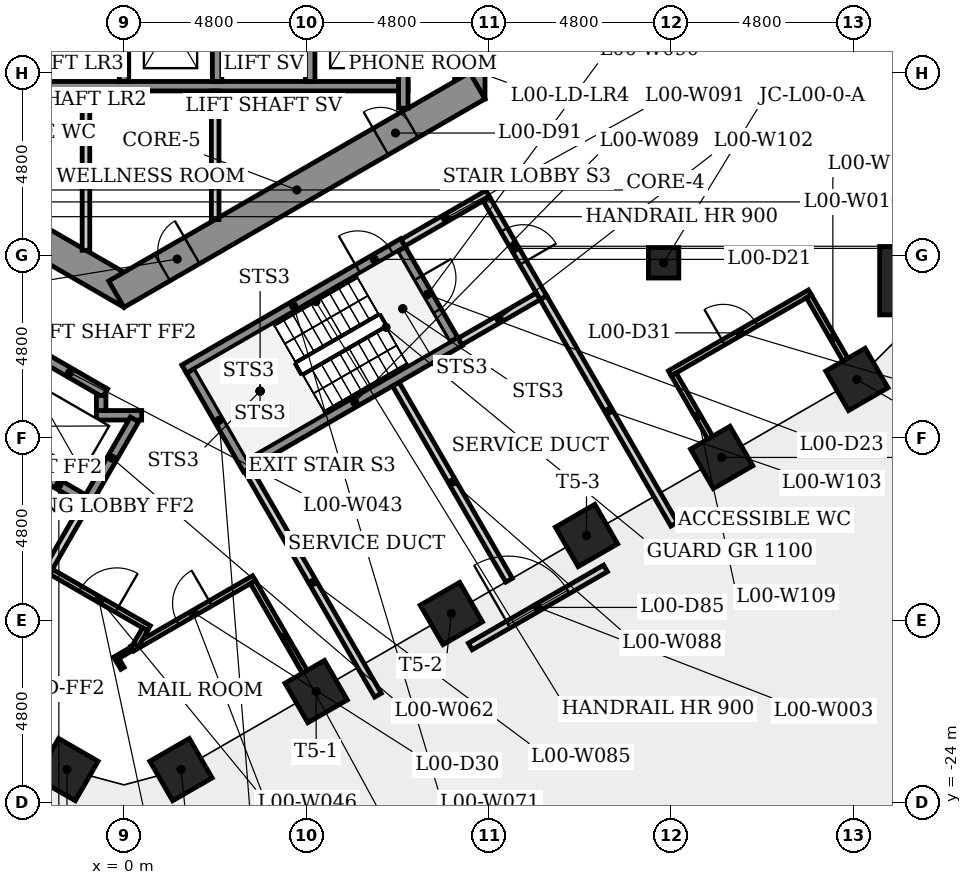
"""IFC4 building model, lengths in metres.
Left out: names, types, materials, properties, quantities, classifications, styles, units other than length and angle.
Written with IfcOpenShell. Run it as: python <this file> out.ifc"""

import sys

from ifc_helpers import new_model, si_unit, direction, frame, frame_2d, origin, origin_2d, place, context, subcontext, project, spatial, rectangle, extrude, element, fill, save


model = new_model("IFC4")
c1 = context("Model", 3, precision=1e-05, world=origin(), true_north=direction((0.0, 1.0)))
c2 = subcontext(c1, "Body", "Model", "MODEL_VIEW")
j1 = project(units=[si_unit("LENGTHUNIT", "METRE"), si_unit("PLANEANGLEUNIT", "RADIAN")], contexts=[c1])
p1 = place(None, origin())
s1 = spatial("IfcSite", under=j1, at=p1, CompositionType="ELEMENT")
p2 = place(p1, origin())
s2 = spatial("IfcBuilding", under=s1, at=p2, CompositionType="ELEMENT")
p3 = place(p2, origin())
s3 = spatial("IfcBuildingStorey", under=s2, at=p3, CompositionType="ELEMENT", Elevation=0.0)
p4 = place(p3, frame((9.1, -5.485, -0.5), z_axis=(0.0, 0.0, 1.0), x_axis=(0.0, 1.0, 0.0)))
e1 = element("IfcWall", 1, at=p4, inside=s3, PredefinedType="SHEAR", context=c2, shape_type="SweptSolid", body=[
    extrude(rectangle(XDim=10.97, YDim=0.8, at=frame_2d((5.485, 0.0))), origin(), (0.0, 0.0, 1.0), 7.5),
])
p5 = place(p4, frame((4.685, 0.0, 0.5)))
e2 = element("IfcOpeningElement", 2, at=p5, cuts=e1, PredefinedType="OPENING", context=c2, shape_type="SweptSolid", body=[
    extrude(rectangle(XDim=1.6, YDim=2.1, at=frame_2d((0.8, 1.05))), frame((0.0, 0.41, 0.0), z_axis=(0.0, -1.0, 0.0), x_axis=(1.0, 0.0, 0.0)), (0.0, 0.0, 1.0), 0.82),
])
p6 = place(p3, frame((-9.3, -5.138, -0.5), z_axis=(0.0, 0.0, 1.0), x_axis=(0.866023993627, -0.500002442456, 0.0)))
e3 = element("IfcWall", 3, at=p6, inside=s3, PredefinedType="SHEAR", context=c2, shape_type="SweptSolid", body=[
    extrude(rectangle(XDim=10.97, YDim=0.8, at=frame_2d((5.485, 0.0))), origin(), (0.0, 0.0, 1.0), 7.5),
])
p7 = place(p6, frame((2.845, 0.0, 0.5)))
e4 = element("IfcOpeningElement", 4, at=p7, cuts=e3, PredefinedType="OPENING", context=c2, shape_type="SweptSolid", body=[
    extrude(rectangle(XDim=0.9, YDim=2.1, at=frame_2d((0.45, 1.05))), frame((0.0, 0.41, 0.0), z_axis=(0.0, -1.0, 0.0), x_axis=(1.0, 0.0, 0.0)), (0.0, 0.0, 1.0), 0.82),
])
p8 = place(p3, frame((-0.2, -10.623, -0.5), z_axis=(0.0, 0.0, 1.0), x_axis=(0.866023993627, 0.500002442456, 0.0)))
e5 = element("IfcWall", 5, at=p8, inside=s3, PredefinedType="SHEAR", context=c2, shape_type="SweptSolid", body=[
    extrude(rectangle(XDim=10.97, YDim=0.8, at=frame_2d((5.485, 0.0))), origin(), (0.0, 0.0, 1.0), 7.5),
])
p9 = place(p8, frame((1.398, 0.0, 0.5)))
e6 = element("IfcOpeningElement", 6, at=p9, cuts=e5, PredefinedType="OPENING", context=c2, shape_type="SweptSolid", body=[
    extrude(rectangle(XDim=0.9, YDim=2.1, at=frame_2d((0.45, 1.05))), frame((0.0, 0.41, 0.0), z_axis=(0.0, -1.0, 0.0), x_axis=(1.0, 0.0, 0.0)), (0.0, 0.0, 1.0), 0.82),
])
p10 = place(p8, frame((8.032, 0.0, 0.5)))
e7 = element("IfcOpeningElement", 7, at=p10, cuts=e5, PredefinedType="OPENING", context=c2, shape_type="SweptSolid", body=[
    extrude(rectangle(XDim=0.9, YDim=2.1, at=frame_2d((0.45, 1.05))), frame((0.0, 0.41, 0.0), z_axis=(0.0, -1.0, 0.0), x_axis=(1.0, 0.0, 0.0)), (0.0, 0.0, 1.0), 0.82),
])
p11 = place(p3, frame((20.785, -10.268, -0.5), z_axis=(0.0, 0.0, 1.0), x_axis=(1.0, 0.0, 0.0)))
e8 = element("IfcColumn", 8, at=p11, inside=s3, PredefinedType="COLUMN", context=c2, shape_type="SweptSolid", body=[
    extrude(rectangle(XDim=1.8, YDim=1.8, at=origin_2d()), origin(), (0.0, 0.0, 1.0), 7.5),
])
for number, where, z_axis, x_axis in (
    (9, (-1.5, -23.134, -0.5), (0.0, 0.0, 1.0), (-0.5, -0.866, 0.0)),
    (10, (1.5, -23.134, -0.5), (0.0, 0.0, 1.0), (0.5, -0.866, 0.0)),
    (11, (5.057, -21.08, -0.5), (0.0, 0.0, 1.0), (0.5, -0.866, 0.0)),
    (12, (8.614, -19.027, -0.5), (0.0, 0.0, 1.0), (0.5, -0.866, 0.0)),
    (13, (12.171, -16.973, -0.5), (0.0, 0.0, 1.0), (0.5, -0.866, 0.0)),
    (14, (15.728, -14.92, -0.5), (0.0, 0.0, 1.0), (0.5, -0.866, 0.0)),
    (15, (19.285, -12.866, -0.5), (0.0, 0.0, 1.0), (0.5, -0.866, 0.0)),
):
    element("IfcColumn", number, at=place(p3, frame(where, z_axis=z_axis, x_axis=x_axis)), inside=s3, PredefinedType="COLUMN", context=c2, shape_type="SweptSolid", body=[
        extrude(rectangle(XDim=1.2, YDim=1.2, at=origin_2d()), origin(), (0.0, 0.0, 1.0), 7.5),
    ])
p12 = place(p3, frame((14.2, -9.798, -0.5), z_axis=(0.0, 0.0, 1.0), x_axis=(1.0, 0.0, 0.0)))
e16 = element("IfcColumn", 16, at=p12, inside=s3, PredefinedType="COLUMN", context=c2, shape_type="SweptSolid", body=[
    extrude(rectangle(XDim=0.8, YDim=0.8, at=origin_2d()), origin(), (0.0, 0.0, 1.0), 7.5),
])
p13 = place(p3, frame((9.114, -19.893, 0.0), z_axis=(0.0, 0.0, 1.0), x_axis=(0.866036113234, 0.499981450231, 0.0)))
e17 = element("IfcWall", 17, at=p13, inside=s3, PredefinedType="SOLIDWALL", context=c2, shape_type="SweptSolid", body=[
    extrude(rectangle(XDim=4.107, YDim=0.2, at=frame_2d((2.054, 0.0))), origin(), (0.0, 0.0, 1.0), 7.0),
])
p14 = place(p13, frame((1.154, 0.0, 0.0)))
e18 = element("IfcOpeningElement", 18, at=p14, cuts=e17, PredefinedType="OPENING", context=c2, shape_type="SweptSolid", body=[
    extrude(rectangle(XDim=1.8, YDim=2.6, at=frame_2d((0.9, 1.3))), frame((0.0, 0.11, 0.0), z_axis=(0.0, -1.0, 0.0), x_axis=(1.0, 0.0, 0.0)), (0.0, 0.0, 1.0), 0.22),
])
p15 = place(p13, frame((1.154, 0.0, 3.0)))
e19 = element("IfcOpeningElement", 19, at=p15, cuts=e17, PredefinedType="OPENING", context=c2, shape_type="SweptSolid", body=[
    extrude(rectangle(XDim=1.8, YDim=2.2, at=frame_2d((0.9, 1.1))), frame((0.0, 0.11, 0.0), z_axis=(0.0, -1.0, 0.0), x_axis=(1.0, 0.0, 0.0)), (0.0, 0.0, 1.0), 0.22),
])
p16 = place(p3, frame((-7.225, -5.15, 0.0), z_axis=(0.0, 0.0, 1.0), x_axis=(1.0, 0.0, 0.0)))
e20 = element("IfcWall", 20, at=p16, inside=s3, PredefinedType="SHEAR", context=c2, shape_type="SweptSolid", body=[
    extrude(rectangle(XDim=14.7, YDim=0.25, at=frame_2d((7.35, 0.0))), origin(), (0.0, 0.0, 1.0), 6.6),
])
p17 = place(p3, frame((-2.364, -12.145, 0.0), z_axis=(0.0, 0.0, 1.0), x_axis=(0.86603892542, -0.499976579108, 0.0)))
e21 = element("IfcWall", 21, at=p17, inside=s3, PredefinedType="SHEAR", context=c2, shape_type="SweptSolid", body=[
    extrude(rectangle(XDim=2.162, YDim=0.25, at=frame_2d((1.081, 0.0))), origin(), (0.0, 0.0, 1.0), 6.6),
])
p18 = place(p3, frame((-1.92, -17.926, 0.0), z_axis=(0.0, 0.0, 1.0), x_axis=(0.866017493347, -0.500013701029, 0.0)))
e22 = element("IfcWall", 22, at=p18, inside=s3, PredefinedType="PARTITIONING", context=c2, shape_type="SweptSolid", body=[
    extrude(rectangle(XDim=2.975, YDim=0.15, at=frame_2d((1.488, 0.0))), origin(), (0.0, 0.0, 1.0), 6.6),
])
p19 = place(p18, frame((0.9, 0.0, 0.0)))
e23 = element("IfcOpeningElement", 23, at=p19, cuts=e22, PredefinedType="OPENING", context=c2, shape_type="SweptSolid", body=[
    extrude(rectangle(XDim=1.1, YDim=2.1, at=frame_2d((0.55, 1.05))), frame((0.0, 0.085, 0.0), z_axis=(0.0, -1.0, 0.0), x_axis=(1.0, 0.0, 0.0)), (0.0, 0.0, 1.0), 0.17),
])
p20 = place(p3, frame((-1.92, -17.926, 0.0), z_axis=(0.0, 0.0, 1.0), x_axis=(-0.86605622881, 0.499946605688, 0.0)))
e24 = element("IfcWall", 24, at=p20, inside=s3, PredefinedType="PLUMBINGWALL", context=c2, shape_type="SweptSolid", body=[
    extrude(rectangle(XDim=2.2, YDim=0.2, at=frame_2d((1.1, 0.0))), origin(), (0.0, 0.0, 1.0), 6.6),
])
p21 = place(p3, frame((-1.0, -5.275, 0.0), z_axis=(0.0, 0.0, 1.0), x_axis=(0.0, -1.0, 0.0)))
e25 = element("IfcWall", 25, at=p21, inside=s3, PredefinedType="PARTITIONING", context=c2, shape_type="SweptSolid", body=[
    extrude(rectangle(XDim=4.194, YDim=0.2, at=frame_2d((2.097, 0.0))), origin(), (0.0, 0.0, 1.0), 6.6),
])
p22 = place(p3, frame((-0.856, -16.133, 0.0), z_axis=(0.0, 0.0, 1.0), x_axis=(-0.866021716278, 0.500006386895, 0.0)))
e26 = element("IfcWall", 26, at=p22, inside=s3, PredefinedType="SHEAR", context=c2, shape_type="SweptSolid", body=[
    extrude(rectangle(XDim=3.3, YDim=0.25, at=frame_2d((1.65, 0.0))), origin(), (0.0, 0.0, 1.0), 6.6),
])
p23 = place(p3, frame((-1.027, -16.179, 0.0), z_axis=(0.0, 0.0, 1.0), x_axis=(-0.499923224849, -0.866069725401, 0.0)))
e27 = element("IfcWall", 27, at=p23, inside=s3, PredefinedType="PLUMBINGWALL", context=c2, shape_type="SweptSolid", body=[
    extrude(rectangle(XDim=1.86, YDim=0.2, at=frame_2d((0.93, 0.0))), origin(), (0.0, 0.0, 1.0), 6.6),
])
p24 = place(p3, frame((-0.725, -13.81, 0.0), z_axis=(0.0, 0.0, 1.0), x_axis=(1.0, 0.0, 0.0)))
e28 = element("IfcWall", 28, at=p24, inside=s3, PredefinedType="SHEAR", context=c2, shape_type="SweptSolid", body=[
    extrude(rectangle(XDim=1.191, YDim=0.25, at=frame_2d((0.595, 0.0))), origin(), (0.0, 0.0, 1.0), 6.6),
])
p25 = place(p3, frame((-0.6, -13.289, 0.0), z_axis=(0.0, 0.0, 1.0), x_axis=(0.0, -1.0, 0.0)))
e29 = element("IfcWall", 29, at=p25, inside=s3, PredefinedType="SHEAR", context=c2, shape_type="SweptSolid", body=[
    extrude(rectangle(XDim=0.396, YDim=0.25, at=frame_2d((0.198, 0.0))), origin(), (0.0, 0.0, 1.0), 7.0),
])
p26 = place(p3, frame((-0.243, -20.215, 0.0), z_axis=(0.0, 0.0, 1.0), x_axis=(0.866032814021, 0.499987164874, 0.0)))
e30 = element("IfcWall", 30, at=p26, inside=s3, PredefinedType="PARTITIONING", context=c2, shape_type="SweptSolid", body=[
    extrude(rectangle(XDim=0.532, YDim=0.1, at=frame_2d((0.266, 0.0))), origin(), (0.0, 0.0, 1.0), 6.6),
])
p27 = place(p3, frame((-0.039, -20.468, 0.0), z_axis=(0.0, 0.0, 1.0), x_axis=(-0.500007885066, 0.866020851292, 0.0)))
e31 = element("IfcWall", 31, at=p27, inside=s3, PredefinedType="PARTITIONING", context=c2, shape_type="SweptSolid", body=[
    extrude(rectangle(XDim=0.271, YDim=0.1, at=frame_2d((0.136, 0.0))), origin(), (0.0, 0.0, 1.0), 6.6),
])
p28 = place(p3, frame((0.0, -1.925, 0.0), z_axis=(0.0, 0.0, 1.0), x_axis=(0.0, -1.0, 0.0)))
e32 = element("IfcWall", 32, at=p28, inside=s3, PredefinedType="SHEAR", context=c2, shape_type="SweptSolid", body=[
    extrude(rectangle(XDim=3.1, YDim=0.25, at=frame_2d((1.55, 0.0))), origin(), (0.0, 0.0, 1.0), 7.0),
])
p29 = place(p3, frame((0.217, -19.948, 0.0), z_axis=(0.0, 0.0, 1.0), x_axis=(0.866033964044, 0.499985172903, 0.0)))
e33 = element("IfcWall", 33, at=p29, inside=s3, PredefinedType="PARTITIONING", context=c2, shape_type="SweptSolid", body=[
    extrude(rectangle(XDim=3.7, YDim=0.15, at=frame_2d((1.85, 0.0))), origin(), (0.0, 0.0, 1.0), 6.6),
])
p30 = place(p29, frame((1.38, 0.0, 0.0)))
e34 = element("IfcOpeningElement", 34, at=p30, cuts=e33, PredefinedType="OPENING", context=c2, shape_type="SweptSolid", body=[
    extrude(rectangle(XDim=1.0, YDim=2.1, at=frame_2d((0.5, 1.05))), frame((0.0, 0.085, 0.0), z_axis=(0.0, -1.0, 0.0), x_axis=(1.0, 0.0, 0.0)), (0.0, 0.0, 1.0), 0.17),
])
p31 = place(p3, frame((0.278, -13.918, 0.0), z_axis=(0.0, 0.0, 1.0), x_axis=(-0.49998806882, -0.866032292145, 0.0)))
e35 = element("IfcWall", 35, at=p31, inside=s3, PredefinedType="SHEAR", context=c2, shape_type="SweptSolid", body=[
    extrude(rectangle(XDim=2.36, YDim=0.25, at=frame_2d((1.18, 0.0))), origin(), (0.0, 0.0, 1.0), 7.0),
])
p32 = place(p3, frame((0.554, -19.441, 0.0), z_axis=(0.0, 0.0, 1.0), x_axis=(-0.499842898591, -0.866116087328, 0.0)))
e36 = element("IfcWall", 36, at=p32, inside=s3, PredefinedType="PARTITIONING", context=c2, shape_type="SweptSolid", body=[
    extrude(rectangle(XDim=0.468, YDim=0.15, at=frame_2d((0.234, 0.0))), origin(), (0.0, 0.0, 1.0), 6.6),
])
p33 = place(p3, frame((1.585, -12.595, 0.0), z_axis=(0.0, 0.0, 1.0), x_axis=(0.866036417653, 0.499980922934, 0.0)))
e37 = element("IfcWall", 37, at=p33, inside=s3, PredefinedType="SHEAR", context=c2, shape_type="SweptSolid", body=[
    extrude(rectangle(XDim=6.65, YDim=0.25, at=frame_2d((3.325, 0.0))), origin(), (0.0, 0.0, 1.0), 6.6),
])
p34 = place(p33, frame((5.275, 0.0, 0.0)))
e38 = element("IfcOpeningElement", 38, at=p34, cuts=e37, PredefinedType="OPENING", context=c2, shape_type="SweptSolid", body=[
    extrude(rectangle(XDim=1.0, YDim=2.1, at=frame_2d((0.5, 1.05))), frame((0.0, 0.135, 0.0), z_axis=(0.0, -1.0, 0.0), x_axis=(1.0, 0.0, 0.0)), (0.0, 0.0, 1.0), 0.27),
])
p35 = place(p3, frame((2.4, -5.275, 0.0), z_axis=(0.0, 0.0, 1.0), x_axis=(0.0, -1.0, 0.0)))
e39 = element("IfcWall", 39, at=p35, inside=s3, PredefinedType="PARTITIONING", context=c2, shape_type="SweptSolid", body=[
    extrude(rectangle(XDim=3.385, YDim=0.2, at=frame_2d((1.693, 0.0))), origin(), (0.0, 0.0, 1.0), 6.6),
])
p36 = place(p3, frame((2.45, -1.925, 0.0), z_axis=(0.0, 0.0, 1.0), x_axis=(0.0, -1.0, 0.0)))
e40 = element("IfcWall", 40, at=p36, inside=s3, PredefinedType="SHEAR", context=c2, shape_type="SweptSolid", body=[
    extrude(rectangle(XDim=3.1, YDim=0.25, at=frame_2d((1.55, 0.0))), origin(), (0.0, 0.0, 1.0), 7.0),
])
p37 = place(p3, frame((3.256, -15.239, 0.0), z_axis=(0.0, 0.0, 1.0), x_axis=(-0.50002537861, 0.866010750942, 0.0)))
e41 = element("IfcWall", 41, at=p37, inside=s3, PredefinedType="SHEAR", context=c2, shape_type="SweptSolid", body=[
    extrude(rectangle(XDim=3.0, YDim=0.25, at=frame_2d((1.5, 0.0))), origin(), (0.0, 0.0, 1.0), 6.6),
])
p38 = place(p3, frame((3.394, -18.201, 0.0), z_axis=(0.0, 0.0, 1.0), x_axis=(0.500040251884, -0.866002163101, 0.0)))
e42 = element("IfcWall", 42, at=p38, inside=s3, PredefinedType="PARTITIONING", context=c2, shape_type="SweptSolid", body=[
    extrude(rectangle(XDim=3.325, YDim=0.15, at=frame_2d((1.663, 0.0))), origin(), (0.0, 0.0, 1.0), 6.6),
])
p39 = place(p3, frame((4.9, -1.925, 0.0), z_axis=(0.0, 0.0, 1.0), x_axis=(0.0, -1.0, 0.0)))
e43 = element("IfcWall", 43, at=p39, inside=s3, PredefinedType="SHEAR", context=c2, shape_type="SweptSolid", body=[
    extrude(rectangle(XDim=3.1, YDim=0.25, at=frame_2d((1.55, 0.0))), origin(), (0.0, 0.0, 1.0), 7.0),
])
p40 = place(p3, frame((6.683, -21.176, 0.0), z_axis=(0.0, 0.0, 1.0), x_axis=(-0.499984476993, 0.866034365811, 0.0)))
e44 = element("IfcWall", 44, at=p40, inside=s3, PredefinedType="PLUMBINGWALL", context=c2, shape_type="SweptSolid", body=[
    extrude(rectangle(XDim=6.856, YDim=0.2, at=frame_2d((3.428, 0.0))), origin(), (0.0, 0.0, 1.0), 6.6),
])
p41 = place(p3, frame((7.153, -12.989, 0.0), z_axis=(0.0, 0.0, 1.0), x_axis=(0.500025049464, -0.866010940986, 0.0)))
e45 = element("IfcWall", 45, at=p41, inside=s3, PredefinedType="PLUMBINGWALL", context=c2, shape_type="SweptSolid", body=[
    extrude(rectangle(XDim=5.96, YDim=0.2, at=frame_2d((2.98, 0.0))), origin(), (0.0, 0.0, 1.0), 6.6),
])
p42 = place(p3, frame((3.301, -15.068, 0.0), z_axis=(0.0, 0.0, 1.0), x_axis=(0.866035036182, 0.499983315828, 0.0)))
e46 = element("IfcWall", 46, at=p42, inside=s3, PredefinedType="SHEAR", context=c2, shape_type="SweptSolid", body=[
    extrude(rectangle(XDim=6.4, YDim=0.25, at=frame_2d((3.2, 0.0))), origin(), (0.0, 0.0, 1.0), 6.6),
])
p43 = place(p3, frame((7.298, -9.441, 0.0), z_axis=(0.0, 0.0, 1.0), x_axis=(0.500034990121, -0.866005201286, 0.0)))
e47 = element("IfcWall", 47, at=p43, inside=s3, PredefinedType="SHEAR", context=c2, shape_type="SweptSolid", body=[
    extrude(rectangle(XDim=2.75, YDim=0.25, at=frame_2d((1.375, 0.0))), origin(), (0.0, 0.0, 1.0), 6.6),
])
p44 = place(p43, frame((0.875, 0.0, 0.0)))
e48 = element("IfcOpeningElement", 48, at=p44, cuts=e47, PredefinedType="OPENING", context=c2, shape_type="SweptSolid", body=[
    extrude(rectangle(XDim=1.0, YDim=2.1, at=frame_2d((0.5, 1.05))), frame((0.0, 0.135, 0.0), z_axis=(0.0, -1.0, 0.0), x_axis=(1.0, 0.0, 0.0)), (0.0, 0.0, 1.0), 0.27),
])
p45 = place(p3, frame((7.344, -9.27, 0.0), z_axis=(0.0, 0.0, 1.0), x_axis=(0.866005588531, 0.500034319456, 0.0)))
e49 = element("IfcWall", 49, at=p45, inside=s3, PredefinedType="PARTITIONING", context=c2, shape_type="SweptSolid", body=[
    extrude(rectangle(XDim=2.575, YDim=0.2, at=frame_2d((1.288, 0.0))), origin(), (0.0, 0.0, 1.0), 6.6),
])
p46 = place(p3, frame((7.35, -1.925, 0.0), z_axis=(0.0, 0.0, 1.0), x_axis=(0.0, -1.0, 0.0)))
e50 = element("IfcWall", 50, at=p46, inside=s3, PredefinedType="SHEAR", context=c2, shape_type="SweptSolid", body=[
    extrude(rectangle(XDim=3.805, YDim=0.25, at=frame_2d((1.903, 0.0))), origin(), (0.0, 0.0, 1.0), 6.6),
])
p47 = place(p3, frame((9.537, -8.119, 0.0), z_axis=(0.0, 0.0, 1.0), x_axis=(0.499990139034, -0.866031096941, 0.0)))
e51 = element("IfcWall", 51, at=p47, inside=s3, PredefinedType="PARTITIONING", context=c2, shape_type="SweptSolid", body=[
    extrude(rectangle(XDim=3.0, YDim=0.2, at=frame_2d((1.5, 0.0))), origin(), (0.0, 0.0, 1.0), 6.6),
])
p48 = place(p47, frame((0.935, 0.0, 0.0)))
e52 = element("IfcOpeningElement", 52, at=p48, cuts=e51, PredefinedType="OPENING", context=c2, shape_type="SweptSolid", body=[
    extrude(rectangle(XDim=1.0, YDim=2.1, at=frame_2d((0.5, 1.05))), frame((0.0, 0.11, 0.0), z_axis=(0.0, -1.0, 0.0), x_axis=(1.0, 0.0, 0.0)), (0.0, 0.0, 1.0), 0.22),
])
p49 = place(p3, frame((10.901, -10.681, 0.0), z_axis=(0.0, 0.0, 1.0), x_axis=(-0.866007538022, -0.500030943131, 0.0)))
e53 = element("IfcWall", 53, at=p49, inside=s3, PredefinedType="PLUMBINGWALL", context=c2, shape_type="SweptSolid", body=[
    extrude(rectangle(XDim=2.375, YDim=0.2, at=frame_2d((1.188, 0.0))), origin(), (0.0, 0.0, 1.0), 6.6),
])
p50 = place(p3, frame((11.037, -10.717, 0.0), z_axis=(0.0, 0.0, 1.0), x_axis=(0.499989673903, -0.866031365477, 0.0)))
e54 = element("IfcWall", 54, at=p50, inside=s3, PredefinedType="PLUMBINGWALL", context=c2, shape_type="SweptSolid", body=[
    extrude(rectangle(XDim=6.881, YDim=0.2, at=frame_2d((3.44, 0.0))), origin(), (0.0, 0.0, 1.0), 6.6),
])
p51 = place(p3, frame((14.363, -12.705, 0.0), z_axis=(0.0, 0.0, 1.0), x_axis=(0.866039469337, 0.499975636957, 0.0)))
e55 = element("IfcWall", 55, at=p51, inside=s3, PredefinedType="PARTITIONING", context=c2, shape_type="SweptSolid", body=[
    extrude(rectangle(XDim=4.257, YDim=0.15, at=frame_2d((2.128, 0.0))), origin(), (0.0, 0.0, 1.0), 6.6),
])
p52 = place(p51, frame((1.629, 0.0, 0.0)))
e56 = element("IfcOpeningElement", 56, at=p52, cuts=e55, PredefinedType="OPENING", context=c2, shape_type="SweptSolid", body=[
    extrude(rectangle(XDim=1.0, YDim=2.1, at=frame_2d((0.5, 1.05))), frame((0.0, 0.085, 0.0), z_axis=(0.0, -1.0, 0.0), x_axis=(1.0, 0.0, 0.0)), (0.0, 0.0, 1.0), 0.17),
])
p53 = place(p3, frame((15.728, -14.92, 0.0), z_axis=(0.0, 0.0, 1.0), x_axis=(-0.500048846702, 0.865997200291, 0.0)))
e57 = element("IfcWall", 57, at=p53, inside=s3, PredefinedType="PARTITIONING", context=c2, shape_type="SweptSolid", body=[
    extrude(rectangle(XDim=2.525, YDim=0.15, at=frame_2d((1.263, 0.0))), origin(), (0.0, 0.0, 1.0), 6.6),
])
p54 = place(p3, frame((18.022, -10.679, 0.0), z_axis=(0.0, 0.0, 1.0), x_axis=(0.499976333282, -0.866039067339, 0.0)))
e58 = element("IfcWall", 58, at=p54, inside=s3, PredefinedType="PARTITIONING", context=c2, shape_type="SweptSolid", body=[
    extrude(rectangle(XDim=2.525, YDim=0.15, at=frame_2d((1.262, 0.0))), origin(), (0.0, 0.0, 1.0), 6.6),
])
p55 = place(p14, origin())
e59 = element("IfcDoor", 59, at=p55, inside=s3, OperationType="DOUBLE_DOOR_DOUBLE_SWING", PredefinedType="DOOR", context=c2, shape_type="SweptSolid", body=[
    extrude(rectangle(XDim=1.8, YDim=2.6, at=frame_2d((0.9, 1.3))), frame((0.0, 0.025, 0.0), z_axis=(0.0, -1.0, 0.0), x_axis=(1.0, 0.0, 0.0)), (0.0, 0.0, 1.0), 0.05),
])
fill(e18, e59)
p56 = place(p15, origin())
e60 = element("IfcWindow", 60, at=p56, inside=s3, PartitioningType="SINGLE_PANEL", PredefinedType="WINDOW", context=c2, shape_type="SweptSolid", body=[
    extrude(rectangle(XDim=1.8, YDim=2.2, at=frame_2d((0.9, 1.1))), frame((0.0, 0.03, 0.0), z_axis=(0.0, -1.0, 0.0), x_axis=(1.0, 0.0, 0.0)), (0.0, 0.0, 1.0), 0.06),
])
fill(e19, e60)
p57 = place(p34, origin())
e61 = element("IfcDoor", 61, at=p57, inside=s3, OperationType="SINGLE_SWING_LEFT", PredefinedType="DOOR", context=c2, shape_type="SweptSolid", body=[
    extrude(rectangle(XDim=1.0, YDim=2.1, at=frame_2d((0.5, 1.05))), frame((0.0, 0.025, 0.0), z_axis=(0.0, -1.0, 0.0), x_axis=(1.0, 0.0, 0.0)), (0.0, 0.0, 1.0), 0.05),
])
fill(e38, e61)
p58 = place(p48, origin())
e62 = element("IfcDoor", 62, at=p58, inside=s3, OperationType="SINGLE_SWING_RIGHT", PredefinedType="DOOR", context=c2, shape_type="SweptSolid", body=[
    extrude(rectangle(XDim=1.0, YDim=2.1, at=frame_2d((0.5, 1.05))), frame((0.0, 0.025, 0.0), z_axis=(0.0, -1.0, 0.0), x_axis=(1.0, 0.0, 0.0)), (0.0, 0.0, 1.0), 0.05),
])
fill(e52, e62)
p59 = place(p44, origin())
e63 = element("IfcDoor", 63, at=p59, inside=s3, OperationType="SINGLE_SWING_LEFT", PredefinedType="DOOR", context=c2, shape_type="SweptSolid", body=[
    extrude(rectangle(XDim=1.0, YDim=2.1, at=frame_2d((0.5, 1.05))), frame((0.0, 0.025, 0.0), z_axis=(0.0, -1.0, 0.0), x_axis=(1.0, 0.0, 0.0)), (0.0, 0.0, 1.0), 0.05),
])
fill(e48, e63)
p60 = place(p30, origin())
e64 = element("IfcDoor", 64, at=p60, inside=s3, OperationType="SINGLE_SWING_RIGHT", PredefinedType="DOOR", context=c2, shape_type="SweptSolid", body=[
    extrude(rectangle(XDim=1.0, YDim=2.1, at=frame_2d((0.5, 1.05))), frame((0.0, 0.025, 0.0), z_axis=(0.0, -1.0, 0.0), x_axis=(1.0, 0.0, 0.0)), (0.0, 0.0, 1.0), 0.05),
])
fill(e34, e64)
p61 = place(p52, origin())
e65 = element("IfcDoor", 65, at=p61, inside=s3, OperationType="SINGLE_SWING_LEFT", PredefinedType="DOOR", context=c2, shape_type="SweptSolid", body=[
    extrude(rectangle(XDim=1.0, YDim=2.1, at=frame_2d((0.5, 1.05))), frame((0.0, 0.025, 0.0), z_axis=(0.0, -1.0, 0.0), x_axis=(1.0, 0.0, 0.0)), (0.0, 0.0, 1.0), 0.05),
])
fill(e56, e65)
p62 = place(p19, origin())
e66 = element("IfcDoor", 66, at=p62, inside=s3, OperationType="SINGLE_SWING_RIGHT", PredefinedType="DOOR", context=c2, shape_type="SweptSolid", body=[
    extrude(rectangle(XDim=1.1, YDim=2.1, at=frame_2d((0.55, 1.05))), frame((0.0, 0.025, 0.0), z_axis=(0.0, -1.0, 0.0), x_axis=(1.0, 0.0, 0.0)), (0.0, 0.0, 1.0), 0.05),
])
fill(e23, e66)
p63 = place(p9, origin())
e67 = element("IfcDoor", 67, at=p63, inside=s3, OperationType="SINGLE_SWING_RIGHT", PredefinedType="DOOR", context=c2, shape_type="SweptSolid", body=[
    extrude(rectangle(XDim=0.9, YDim=2.1, at=frame_2d((0.45, 1.05))), frame((0.0, 0.025, 0.0), z_axis=(0.0, -1.0, 0.0), x_axis=(1.0, 0.0, 0.0)), (0.0, 0.0, 1.0), 0.05),
])
fill(e6, e67)
p64 = place(p10, origin())
e68 = element("IfcDoor", 68, at=p64, inside=s3, OperationType="SINGLE_SWING_LEFT", PredefinedType="DOOR", context=c2, shape_type="SweptSolid", body=[
    extrude(rectangle(XDim=0.9, YDim=2.1, at=frame_2d((0.45, 1.05))), frame((0.0, 0.025, 0.0), z_axis=(0.0, -1.0, 0.0), x_axis=(1.0, 0.0, 0.0)), (0.0, 0.0, 1.0), 0.05),
])
fill(e7, e68)
save(model, sys.argv[1])
